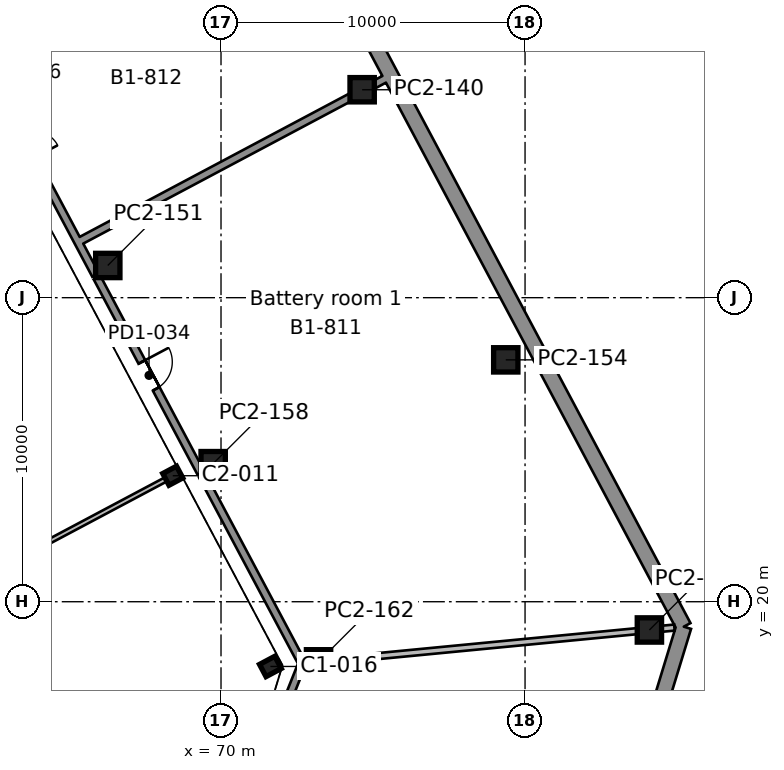
"""IFC4 building model, lengths in metres.
Left out: names, types, materials, properties, quantities, classifications, styles, units other than length and angle.
Written with IfcOpenShell. Run it as: python <this file> out.ifc"""

import sys

from ifc_helpers import new_model, si_unit, direction, frame, frame_2d, origin, origin_2d, place, context, subcontext, project, spatial, rectangle, i_section, extrude, element, fill, save


model = new_model("IFC4")
c1 = context("Model", 3, precision=1e-05, world=origin(), true_north=direction((0.0, 1.0)))
c2 = subcontext(c1, "Body", "Model", "MODEL_VIEW")
j1 = project(units=[si_unit("LENGTHUNIT", "METRE"), si_unit("PLANEANGLEUNIT", "RADIAN")], contexts=[c1])
p1 = place(None, origin())
s1 = spatial("IfcSite", under=j1, at=p1, CompositionType="ELEMENT")
p2 = place(p1, origin())
s2 = spatial("IfcBuilding", under=s1, at=p2, CompositionType="ELEMENT")
p3 = place(p2, frame((0.0, 0.0, -4.5)))
s3 = spatial("IfcBuildingStorey", under=s2, at=p3, CompositionType="ELEMENT", Elevation=-4.5)
p4 = place(p3, frame((71.625, 17.871, 0.0), z_axis=(0.0, 0.0, 1.0), x_axis=(-0.469471562786, 0.882947592859, 0.0)))
e1 = element("IfcColumn", 1, at=p4, inside=s3, PredefinedType="COLUMN", context=c2, shape_type="SweptSolid", body=[
    extrude(i_section(OverallWidth=0.455, OverallDepth=0.569, WebThickness=0.078, FlangeThickness=0.125, FilletRadius=0.015, at=origin_2d()), origin(), (0.0, 0.0, 1.0), 4.5),
])
p5 = place(p3, frame((68.413, 24.144, 0.0), z_axis=(0.0, 0.0, 1.0), x_axis=(-0.469471562786, 0.882947592859, 0.0)))
e2 = element("IfcColumn", 2, at=p5, inside=s3, PredefinedType="COLUMN", context=c2, shape_type="SweptSolid", body=[
    extrude(i_section(OverallWidth=0.437, OverallDepth=0.513, WebThickness=0.061, FlangeThickness=0.097, FilletRadius=0.015, at=origin_2d()), origin(), (0.0, 0.0, 1.0), 4.5),
])
p6 = place(p3, frame((81.013, 5.418, 0.0), z_axis=(0.0, 0.0, 1.0), x_axis=(0.292375850554, 0.956303488445, 0.0)))
e3 = element("IfcWall", 3, at=p6, inside=s3, PredefinedType="SOLIDWALL", context=c2, shape_type="SweptSolid", body=[
    extrude(rectangle(XDim=14.391, YDim=0.5, at=frame_2d((7.195, 0.0))), origin(), (0.0, 0.0, 1.0), 4.5),
])
p7 = place(p3, frame((85.221, 19.18, 0.0), z_axis=(0.0, 0.0, 1.0), x_axis=(-0.469470569953, 0.882948120757, 0.0)))
e4 = element("IfcWall", 4, at=p7, inside=s3, PredefinedType="SOLIDWALL", context=c2, shape_type="SweptSolid", body=[
    extrude(rectangle(XDim=46.148, YDim=0.5, at=frame_2d((23.074, 0.0))), origin(), (0.0, 0.0, 1.0), 4.5),
])
for number, where, z_axis, x_axis in (
    (5, (73.208, 18.023, 0.0), (0.0, 0.0, 1.0), (1.0, 0.0, 0.0)),
    (6, (84.09, 19.071, 0.0), (0.0, 0.0, 1.0), (1.0, 0.0, 0.0)),
    (7, (69.742, 24.541, 0.0), (0.0, 0.0, 1.0), (1.0, 0.0, 0.0)),
    (8, (79.366, 27.955, 0.0), (0.0, 0.0, 1.0), (1.0, 0.0, 0.0)),
    (9, (66.276, 31.059, 0.0), (0.0, 0.0, 1.0), (1.0, 0.0, 0.0)),
    (10, (74.642, 36.839, 0.0), (0.0, 0.0, 1.0), (1.0, 0.0, 0.0)),
):
    element("IfcColumn", number, at=place(p3, frame(where, z_axis=z_axis, x_axis=x_axis)), inside=s3, PredefinedType="COLUMN", context=c2, shape_type="SweptSolid", body=[
        extrude(rectangle(XDim=0.8, YDim=0.8, at=origin_2d()), origin(), (0.0, 0.0, 1.0), 4.05),
    ])
p8 = place(p3, frame((84.912, 19.15, 0.0), z_axis=(0.0, 0.0, 1.0), x_axis=(-0.995412196651, -0.095679458393, 0.0)))
e11 = element("IfcWall", 11, at=p8, inside=s3, PredefinedType="PARTITIONING", context=c2, shape_type="SweptSolid", body=[
    extrude(rectangle(XDim=0.424, YDim=0.2, at=frame_2d((0.212, 0.0))), origin(), (0.0, 0.0, 1.0), 4.05),
])
p9 = place(p3, frame((83.69, 19.032, 0.0), z_axis=(0.0, 0.0, 1.0), x_axis=(-0.995397009029, -0.095837333105, 0.0)))
e12 = element("IfcWall", 12, at=p9, inside=s3, PredefinedType="PARTITIONING", context=c2, shape_type="SweptSolid", body=[
    extrude(rectangle(XDim=10.129, YDim=0.2, at=frame_2d((5.064, 0.0))), origin(), (0.0, 0.0, 1.0), 4.05),
])
p10 = place(p3, frame((72.669, 17.971, 0.0), z_axis=(0.0, 0.0, 1.0), x_axis=(-0.370009777786, -0.929027859831, 0.0)))
e13 = element("IfcWall", 13, at=p10, inside=s3, PredefinedType="SOLIDWALL", context=c2, shape_type="SweptSolid", body=[
    extrude(rectangle(XDim=5.184, YDim=0.25, at=frame_2d((2.592, 0.0))), origin(), (0.0, 0.0, 1.0), 4.05),
])
p11 = place(p3, frame((75.366, 37.182, 0.0), z_axis=(0.0, 0.0, 1.0), x_axis=(-0.882960484464, -0.4694473164, 0.0)))
e14 = element("IfcWall", 14, at=p11, inside=s3, PredefinedType="SOLIDWALL", context=c2, shape_type="SweptSolid", body=[
    extrude(rectangle(XDim=0.367, YDim=0.25, at=frame_2d((0.183, 0.0))), origin(), (0.0, 0.0, 1.0), 4.05),
])
p12 = place(p3, frame((74.242, 36.585, 0.0), z_axis=(0.0, 0.0, 1.0), x_axis=(-0.882936179938, -0.469493026738, 0.0)))
e15 = element("IfcWall", 15, at=p12, inside=s3, PredefinedType="SOLIDWALL", context=c2, shape_type="SweptSolid", body=[
    extrude(rectangle(XDim=10.127, YDim=0.25, at=frame_2d((5.063, 0.0))), origin(), (0.0, 0.0, 1.0), 4.05),
])
p13 = place(p3, frame((65.303, 31.825, 0.0), z_axis=(0.0, 0.0, 1.0), x_axis=(0.46947695358, -0.882944726502, 0.0)))
e16 = element("IfcWall", 16, at=p13, inside=s3, PredefinedType="SOLIDWALL", context=c2, shape_type="SweptSolid", body=[
    extrude(rectangle(XDim=1.22, YDim=0.25, at=frame_2d((0.61, 0.0))), origin(), (0.0, 0.0, 1.0), 4.05),
])
p14 = place(p3, frame((65.923, 30.659, 0.0), z_axis=(0.0, 0.0, 1.0), x_axis=(0.469479540895, -0.882943350777, 0.0)))
e17 = element("IfcWall", 17, at=p14, inside=s3, PredefinedType="SOLIDWALL", context=c2, shape_type="SweptSolid", body=[
    extrude(rectangle(XDim=7.283, YDim=0.25, at=frame_2d((3.642, 0.0))), origin(), (0.0, 0.0, 1.0), 4.05),
])
p15 = place(p14, frame((3.141, 0.0, 0.0)))
e18 = element("IfcOpeningElement", 18, at=p15, cuts=e17, PredefinedType="OPENING", context=c2, shape_type="SweptSolid", body=[
    extrude(rectangle(XDim=1.0, YDim=2.1, at=frame_2d((0.5, 1.05))), frame((0.0, 0.135, 0.0), z_axis=(0.0, -1.0, 0.0), x_axis=(1.0, 0.0, 0.0)), (0.0, 0.0, 1.0), 0.27),
])
p16 = place(p3, frame((69.389, 24.141, 0.0), z_axis=(0.0, 0.0, 1.0), x_axis=(0.469461736628, -0.882952817449, 0.0)))
e19 = element("IfcWall", 19, at=p16, inside=s3, PredefinedType="SOLIDWALL", context=c2, shape_type="SweptSolid", body=[
    extrude(rectangle(XDim=6.988, YDim=0.25, at=frame_2d((3.494, 0.0))), origin(), (0.0, 0.0, 1.0), 4.05),
])
p17 = place(p3, frame((62.457, 37.177, 0.0), z_axis=(0.0, 0.0, 1.0), x_axis=(0.469458615732, -0.882954476808, 0.0)))
e20 = element("IfcWall", 20, at=p17, inside=s3, PredefinedType="SOLIDWALL", context=c2, shape_type="SweptSolid", body=[
    extrude(rectangle(XDim=6.06, YDim=0.25, at=frame_2d((3.03, 0.0))), origin(), (0.0, 0.0, 1.0), 4.05),
])
p18 = place(p17, frame((1.13, 0.0, 0.0)))
e21 = element("IfcOpeningElement", 21, at=p18, cuts=e20, PredefinedType="OPENING", context=c2, shape_type="SweptSolid", body=[
    extrude(rectangle(XDim=1.8, YDim=2.1, at=frame_2d((0.9, 1.05))), frame((0.0, 0.135, 0.0), z_axis=(0.0, -1.0, 0.0), x_axis=(1.0, 0.0, 0.0)), (0.0, 0.0, 1.0), 0.27),
])
p19 = place(p3, frame((57.957, 18.584, 0.0), z_axis=(0.0, 0.0, 1.0), x_axis=(0.882944872937, 0.469476678179, 0.0)))
e22 = element("IfcWall", 22, at=p19, inside=s3, PredefinedType="PARTITIONING", context=c2, shape_type="SweptSolid", body=[
    extrude(rectangle(XDim=11.586, YDim=0.15, at=frame_2d((5.793, 0.0))), origin(), (0.0, 0.0, 1.0), 4.05),
])
p20 = place(p19, frame((5.273, 0.0, 0.0)))
e23 = element("IfcOpeningElement", 23, at=p20, cuts=e22, PredefinedType="OPENING", context=c2, shape_type="SweptSolid", body=[
    extrude(rectangle(XDim=1.0, YDim=2.1, at=frame_2d((0.5, 1.05))), frame((0.0, 0.085, 0.0), z_axis=(0.0, -1.0, 0.0), x_axis=(1.0, 0.0, 0.0)), (0.0, 0.0, 1.0), 0.17),
])
p21 = place(p15, origin())
e24 = element("IfcDoor", 24, at=p21, inside=s3, OperationType="SINGLE_SWING_LEFT", PredefinedType="DOOR", context=c2, shape_type="SweptSolid", body=[
    extrude(rectangle(XDim=1.0, YDim=2.1, at=frame_2d((0.5, 1.05))), frame((0.0, 0.025, 0.0), z_axis=(0.0, -1.0, 0.0), x_axis=(1.0, 0.0, 0.0)), (0.0, 0.0, 1.0), 0.05),
])
fill(e18, e24)
save(model, sys.argv[1])
